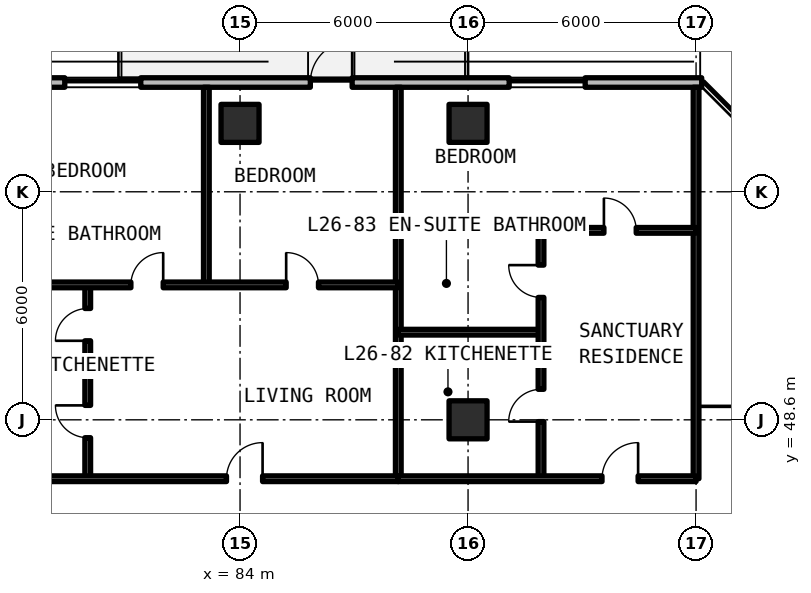
"""IFC4 building model, lengths in metres.
Left out: names, types, materials, properties, quantities, classifications, styles, units other than length and angle.
Written with IfcOpenShell. Run it as: python <this file> out.ifc"""

import sys

from ifc_helpers import new_model, si_unit, direction, frame, frame_2d, origin, origin_2d, place, context, subcontext, project, spatial, rectangle, extrude, element, fill, save


model = new_model("IFC4")
c1 = context("Model", 3, precision=1e-05, world=origin(), true_north=direction((0.0, 1.0)))
c2 = subcontext(c1, "Body", "Model", "MODEL_VIEW")
j1 = project(units=[si_unit("LENGTHUNIT", "METRE"), si_unit("PLANEANGLEUNIT", "RADIAN")], contexts=[c1])
p1 = place(None, origin())
s1 = spatial("IfcSite", under=j1, at=p1, CompositionType="ELEMENT")
p2 = place(p1, origin())
s2 = spatial("IfcBuilding", under=s1, at=p2, CompositionType="ELEMENT")
p3 = place(p2, frame((0.0, 0.0, 95.37)))
s3 = spatial("IfcBuildingStorey", under=s2, at=p3, CompositionType="ELEMENT", Elevation=95.37)
for number, where, z_axis, x_axis in (
    (1, (90.0, 48.6, 0.0), (0.0, 0.0, 1.0), (1.0, 0.0, 0.0)),
    (2, (84.0, 56.4, 0.0), (0.0, 0.0, 1.0), (1.0, 0.0, 0.0)),
    (3, (90.0, 56.4, 0.0), (0.0, 0.0, 1.0), (1.0, 0.0, 0.0)),
):
    element("IfcColumn", number, at=place(p3, frame(where, z_axis=z_axis, x_axis=x_axis)), inside=s3, PredefinedType="COLUMN", context=c2, shape_type="SweptSolid", body=[
        extrude(rectangle(XDim=1.0, YDim=1.0, at=origin_2d()), origin(), (0.0, 0.0, 1.0), 3.3),
    ])
p4 = place(p3, frame((96.148, 57.475, 0.0), z_axis=(0.0, 0.0, 1.0), x_axis=(-1.0, 0.0, 0.0)))
e4 = element("IfcWall", 4, at=p4, inside=s3, PredefinedType="SOLIDWALL", context=c2, shape_type="SweptSolid", body=[
    extrude(rectangle(XDim=44.023, YDim=0.25, at=frame_2d((22.012, 0.0))), origin(), (0.0, 0.0, 1.0), 3.08),
])
p5 = place(p4, frame((33.148, 0.0, 0.0)))
e5 = element("IfcOpeningElement", 5, at=p5, cuts=e4, PredefinedType="OPENING", context=c2, shape_type="SweptSolid", body=[
    extrude(rectangle(XDim=1.1, YDim=2.15, at=frame_2d((0.55, 1.075))), frame((0.0, 0.135, 0.0), z_axis=(0.0, -1.0, 0.0), x_axis=(1.0, 0.0, 0.0)), (0.0, 0.0, 1.0), 0.27),
])
p6 = place(p4, frame((21.298, 0.0, 0.0)))
e6 = element("IfcOpeningElement", 6, at=p6, cuts=e4, PredefinedType="OPENING", context=c2, shape_type="SweptSolid", body=[
    extrude(rectangle(XDim=1.1, YDim=2.15, at=frame_2d((0.55, 1.075))), frame((0.0, 0.135, 0.0), z_axis=(0.0, -1.0, 0.0), x_axis=(1.0, 0.0, 0.0)), (0.0, 0.0, 1.0), 0.27),
])
p7 = place(p4, frame((9.198, 0.0, 0.0)))
e7 = element("IfcOpeningElement", 7, at=p7, cuts=e4, PredefinedType="OPENING", context=c2, shape_type="SweptSolid", body=[
    extrude(rectangle(XDim=1.1, YDim=2.15, at=frame_2d((0.55, 1.075))), frame((0.0, 0.135, 0.0), z_axis=(0.0, -1.0, 0.0), x_axis=(1.0, 0.0, 0.0)), (0.0, 0.0, 1.0), 0.27),
])
p8 = place(p4, frame((39.334, 0.0, 0.78)))
e8 = element("IfcOpeningElement", 8, at=p8, cuts=e4, PredefinedType="OPENING", context=c2, shape_type="SweptSolid", body=[
    extrude(rectangle(XDim=2.0, YDim=1.66, at=frame_2d((1.0, 0.83))), frame((0.0, 0.135, 0.0), z_axis=(0.0, -1.0, 0.0), x_axis=(1.0, 0.0, 0.0)), (0.0, 0.0, 1.0), 0.27),
])
p9 = place(p4, frame((27.354, 0.0, 0.78)))
e9 = element("IfcOpeningElement", 9, at=p9, cuts=e4, PredefinedType="OPENING", context=c2, shape_type="SweptSolid", body=[
    extrude(rectangle(XDim=2.0, YDim=1.66, at=frame_2d((1.0, 0.83))), frame((0.0, 0.135, 0.0), z_axis=(0.0, -1.0, 0.0), x_axis=(1.0, 0.0, 0.0)), (0.0, 0.0, 1.0), 0.27),
])
p10 = place(p4, frame((14.76, 0.0, 0.78)))
e10 = element("IfcOpeningElement", 10, at=p10, cuts=e4, PredefinedType="OPENING", context=c2, shape_type="SweptSolid", body=[
    extrude(rectangle(XDim=2.0, YDim=1.66, at=frame_2d((1.0, 0.83))), frame((0.0, 0.135, 0.0), z_axis=(0.0, -1.0, 0.0), x_axis=(1.0, 0.0, 0.0)), (0.0, 0.0, 1.0), 0.27),
])
p11 = place(p4, frame((3.066, 0.0, 0.78)))
e11 = element("IfcOpeningElement", 11, at=p11, cuts=e4, PredefinedType="OPENING", context=c2, shape_type="SweptSolid", body=[
    extrude(rectangle(XDim=2.0, YDim=1.66, at=frame_2d((1.0, 0.83))), frame((0.0, 0.135, 0.0), z_axis=(0.0, -1.0, 0.0), x_axis=(1.0, 0.0, 0.0)), (0.0, 0.0, 1.0), 0.27),
])
for number, where, z_axis, x_axis in (
    (12, (96.0, 47.05, 0.0), (0.0, 0.0, 1.0), (0.0, 1.0, 0.0)),
    (13, (88.164, 47.05, 0.0), (0.0, 0.0, 1.0), (0.0, 1.0, 0.0)),
):
    element("IfcWall", number, at=place(p3, frame(where, z_axis=z_axis, x_axis=x_axis)), inside=s3, PredefinedType="SOLIDWALL", context=c2, shape_type="SweptSolid", body=[
        extrude(rectangle(XDim=10.3, YDim=0.15, at=frame_2d((5.15, 0.0))), origin(), (0.0, 0.0, 1.0), 2.35),
    ])
p12 = place(p3, frame((77.642, 50.059, 0.0), z_axis=(0.0, 0.0, 1.0), x_axis=(1.0, 0.0, 0.0)))
e14 = element("IfcWall", 14, at=p12, inside=s3, PredefinedType="PARTITIONING", context=c2, shape_type="SweptSolid", body=[
    extrude(rectangle(XDim=2.35, YDim=0.15, at=frame_2d((1.175, 0.0))), origin(), (0.0, 0.0, 1.0), 2.35),
])
p13 = place(p3, frame((79.992, 47.05, 0.0), z_axis=(0.0, 0.0, 1.0), x_axis=(0.0, 1.0, 0.0)))
e15 = element("IfcWall", 15, at=p13, inside=s3, PredefinedType="PARTITIONING", context=c2, shape_type="SweptSolid", body=[
    extrude(rectangle(XDim=5.1, YDim=0.15, at=frame_2d((2.55, 0.0))), origin(), (0.0, 0.0, 1.0), 2.35),
])
p14 = place(p13, frame((1.08, 0.0, 0.0)))
e16 = element("IfcOpeningElement", 16, at=p14, cuts=e15, PredefinedType="OPENING", context=c2, shape_type="SweptSolid", body=[
    extrude(rectangle(XDim=0.85, YDim=2.1, at=frame_2d((0.425, 1.05))), frame((0.0, 0.085, 0.0), z_axis=(0.0, -1.0, 0.0), x_axis=(1.0, 0.0, 0.0)), (0.0, 0.0, 1.0), 0.17),
])
p15 = place(p13, frame((3.629, 0.0, 0.0)))
e17 = element("IfcOpeningElement", 17, at=p15, cuts=e15, PredefinedType="OPENING", context=c2, shape_type="SweptSolid", body=[
    extrude(rectangle(XDim=0.85, YDim=2.1, at=frame_2d((0.425, 1.05))), frame((0.0, 0.085, 0.0), z_axis=(0.0, -1.0, 0.0), x_axis=(1.0, 0.0, 0.0)), (0.0, 0.0, 1.0), 0.17),
])
p16 = place(p3, frame((83.114, 52.15, 0.0), z_axis=(0.0, 0.0, 1.0), x_axis=(0.0, 1.0, 0.0)))
e18 = element("IfcWall", 18, at=p16, inside=s3, PredefinedType="PARTITIONING", context=c2, shape_type="SweptSolid", body=[
    extrude(rectangle(XDim=5.2, YDim=0.15, at=frame_2d((2.6, 0.0))), origin(), (0.0, 0.0, 1.0), 2.35),
])
p17 = place(p3, frame((77.642, 52.15, 0.0), z_axis=(0.0, 0.0, 1.0), x_axis=(1.0, 0.0, 0.0)))
e19 = element("IfcWall", 19, at=p17, inside=s3, PredefinedType="PARTITIONING", context=c2, shape_type="SweptSolid", body=[
    extrude(rectangle(XDim=10.522, YDim=0.15, at=frame_2d((5.261, 0.0))), origin(), (0.0, 0.0, 1.0), 2.35),
])
p18 = place(p17, frame((3.486, 0.0, 0.0)))
e20 = element("IfcOpeningElement", 20, at=p18, cuts=e19, PredefinedType="OPENING", context=c2, shape_type="SweptSolid", body=[
    extrude(rectangle(XDim=0.85, YDim=2.1, at=frame_2d((0.425, 1.05))), frame((0.0, 0.085, 0.0), z_axis=(0.0, -1.0, 0.0), x_axis=(1.0, 0.0, 0.0)), (0.0, 0.0, 1.0), 0.17),
])
p19 = place(p17, frame((7.572, 0.0, 0.0)))
e21 = element("IfcOpeningElement", 21, at=p19, cuts=e19, PredefinedType="OPENING", context=c2, shape_type="SweptSolid", body=[
    extrude(rectangle(XDim=0.85, YDim=2.1, at=frame_2d((0.425, 1.05))), frame((0.0, 0.085, 0.0), z_axis=(0.0, -1.0, 0.0), x_axis=(1.0, 0.0, 0.0)), (0.0, 0.0, 1.0), 0.17),
])
p20 = place(p3, frame((77.642, 47.05, 0.0), z_axis=(0.0, 0.0, 1.0), x_axis=(1.0, 0.0, 0.0)))
e22 = element("IfcWall", 22, at=p20, inside=s3, PredefinedType="SOLIDWALL", context=c2, shape_type="SweptSolid", body=[
    extrude(rectangle(XDim=10.522, YDim=0.15, at=frame_2d((5.261, 0.0))), origin(), (0.0, 0.0, 1.0), 2.35),
])
p21 = place(p20, frame((6.001, 0.0, 0.0)))
e23 = element("IfcOpeningElement", 23, at=p21, cuts=e22, PredefinedType="OPENING", context=c2, shape_type="SweptSolid", body=[
    extrude(rectangle(XDim=0.95, YDim=2.15, at=frame_2d((0.475, 1.075))), frame((0.0, 0.085, 0.0), z_axis=(0.0, -1.0, 0.0), x_axis=(1.0, 0.0, 0.0)), (0.0, 0.0, 1.0), 0.17),
])
p22 = place(p3, frame((88.164, 50.906, 0.0), z_axis=(0.0, 0.0, 1.0), x_axis=(1.0, 0.0, 0.0)))
e24 = element("IfcWall", 24, at=p22, inside=s3, PredefinedType="PARTITIONING", context=c2, shape_type="SweptSolid", body=[
    extrude(rectangle(XDim=3.756, YDim=0.15, at=frame_2d((1.878, 0.0))), origin(), (0.0, 0.0, 1.0), 2.35),
])
p23 = place(p3, frame((91.92, 47.05, 0.0), z_axis=(0.0, 0.0, 1.0), x_axis=(0.0, 1.0, 0.0)))
e25 = element("IfcWall", 25, at=p23, inside=s3, PredefinedType="PARTITIONING", context=c2, shape_type="SweptSolid", body=[
    extrude(rectangle(XDim=6.535, YDim=0.15, at=frame_2d((3.268, 0.0))), origin(), (0.0, 0.0, 1.0), 2.35),
])
p24 = place(p23, frame((1.503, 0.0, 0.0)))
e26 = element("IfcOpeningElement", 26, at=p24, cuts=e25, PredefinedType="OPENING", context=c2, shape_type="SweptSolid", body=[
    extrude(rectangle(XDim=0.85, YDim=2.1, at=frame_2d((0.425, 1.05))), frame((0.0, 0.085, 0.0), z_axis=(0.0, -1.0, 0.0), x_axis=(1.0, 0.0, 0.0)), (0.0, 0.0, 1.0), 0.17),
])
p25 = place(p23, frame((4.771, 0.0, 0.0)))
e27 = element("IfcOpeningElement", 27, at=p25, cuts=e25, PredefinedType="OPENING", context=c2, shape_type="SweptSolid", body=[
    extrude(rectangle(XDim=0.85, YDim=2.1, at=frame_2d((0.425, 1.05))), frame((0.0, 0.085, 0.0), z_axis=(0.0, -1.0, 0.0), x_axis=(1.0, 0.0, 0.0)), (0.0, 0.0, 1.0), 0.17),
])
p26 = place(p3, frame((88.164, 53.585, 0.0), z_axis=(0.0, 0.0, 1.0), x_axis=(1.0, 0.0, 0.0)))
e28 = element("IfcWall", 28, at=p26, inside=s3, PredefinedType="PARTITIONING", context=c2, shape_type="SweptSolid", body=[
    extrude(rectangle(XDim=7.836, YDim=0.15, at=frame_2d((3.918, 0.0))), origin(), (0.0, 0.0, 1.0), 2.35),
])
p27 = place(p26, frame((5.411, 0.0, 0.0)))
e29 = element("IfcOpeningElement", 29, at=p27, cuts=e28, PredefinedType="OPENING", context=c2, shape_type="SweptSolid", body=[
    extrude(rectangle(XDim=0.85, YDim=2.1, at=frame_2d((0.425, 1.05))), frame((0.0, 0.085, 0.0), z_axis=(0.0, -1.0, 0.0), x_axis=(1.0, 0.0, 0.0)), (0.0, 0.0, 1.0), 0.17),
])
p28 = place(p3, frame((88.164, 47.05, 0.0), z_axis=(0.0, 0.0, 1.0), x_axis=(1.0, 0.0, 0.0)))
e30 = element("IfcWall", 30, at=p28, inside=s3, PredefinedType="SOLIDWALL", context=c2, shape_type="SweptSolid", body=[
    extrude(rectangle(XDim=7.836, YDim=0.15, at=frame_2d((3.918, 0.0))), origin(), (0.0, 0.0, 1.0), 2.35),
])
p29 = place(p28, frame((5.361, 0.0, 0.0)))
e31 = element("IfcOpeningElement", 31, at=p29, cuts=e30, PredefinedType="OPENING", context=c2, shape_type="SweptSolid", body=[
    extrude(rectangle(XDim=0.95, YDim=2.15, at=frame_2d((0.475, 1.075))), frame((0.0, 0.085, 0.0), z_axis=(0.0, -1.0, 0.0), x_axis=(1.0, 0.0, 0.0)), (0.0, 0.0, 1.0), 0.17),
])
p30 = place(p7, frame((1.1, 0.0, 0.0), z_axis=(0.0, 0.0, 1.0), x_axis=(-1.0, 0.0, 0.0)))
e32 = element("IfcDoor", 32, at=p30, inside=s3, OperationType="SINGLE_SWING_LEFT", PredefinedType="DOOR", context=c2, shape_type="SweptSolid", body=[
    extrude(rectangle(XDim=1.1, YDim=2.15, at=frame_2d((0.55, 1.075))), frame((0.0, 0.025, 0.0), z_axis=(0.0, -1.0, 0.0), x_axis=(1.0, 0.0, 0.0)), (0.0, 0.0, 1.0), 0.05),
])
fill(e7, e32)
p31 = place(p10, origin())
e33 = element("IfcWindow", 33, at=p31, inside=s3, PartitioningType="SINGLE_PANEL", PredefinedType="WINDOW", context=c2, shape_type="SweptSolid", body=[
    extrude(rectangle(XDim=2.0, YDim=1.66, at=frame_2d((1.0, 0.83))), frame((0.0, 0.03, 0.0), z_axis=(0.0, -1.0, 0.0), x_axis=(1.0, 0.0, 0.0)), (0.0, 0.0, 1.0), 0.06),
])
fill(e10, e33)
p32 = place(p11, origin())
e34 = element("IfcWindow", 34, at=p32, inside=s3, PartitioningType="SINGLE_PANEL", PredefinedType="WINDOW", context=c2, shape_type="SweptSolid", body=[
    extrude(rectangle(XDim=2.0, YDim=1.66, at=frame_2d((1.0, 0.83))), frame((0.0, 0.03, 0.0), z_axis=(0.0, -1.0, 0.0), x_axis=(1.0, 0.0, 0.0)), (0.0, 0.0, 1.0), 0.06),
])
fill(e11, e34)
p33 = place(p14, origin())
e35 = element("IfcDoor", 35, at=p33, inside=s3, OperationType="SINGLE_SWING_RIGHT", PredefinedType="DOOR", context=c2, shape_type="SweptSolid", body=[
    extrude(rectangle(XDim=0.85, YDim=2.1, at=frame_2d((0.425, 1.05))), frame((0.0, 0.025, 0.0), z_axis=(0.0, -1.0, 0.0), x_axis=(1.0, 0.0, 0.0)), (0.0, 0.0, 1.0), 0.05),
])
fill(e16, e35)
p34 = place(p15, origin())
e36 = element("IfcDoor", 36, at=p34, inside=s3, OperationType="SINGLE_SWING_LEFT", PredefinedType="DOOR", context=c2, shape_type="SweptSolid", body=[
    extrude(rectangle(XDim=0.85, YDim=2.1, at=frame_2d((0.425, 1.05))), frame((0.0, 0.025, 0.0), z_axis=(0.0, -1.0, 0.0), x_axis=(1.0, 0.0, 0.0)), (0.0, 0.0, 1.0), 0.05),
])
fill(e17, e36)
p35 = place(p18, origin())
e37 = element("IfcDoor", 37, at=p35, inside=s3, OperationType="SINGLE_SWING_RIGHT", PredefinedType="DOOR", context=c2, shape_type="SweptSolid", body=[
    extrude(rectangle(XDim=0.85, YDim=2.1, at=frame_2d((0.425, 1.05))), frame((0.0, 0.025, 0.0), z_axis=(0.0, -1.0, 0.0), x_axis=(1.0, 0.0, 0.0)), (0.0, 0.0, 1.0), 0.05),
])
fill(e20, e37)
p36 = place(p19, origin())
e38 = element("IfcDoor", 38, at=p36, inside=s3, OperationType="SINGLE_SWING_LEFT", PredefinedType="DOOR", context=c2, shape_type="SweptSolid", body=[
    extrude(rectangle(XDim=0.85, YDim=2.1, at=frame_2d((0.425, 1.05))), frame((0.0, 0.025, 0.0), z_axis=(0.0, -1.0, 0.0), x_axis=(1.0, 0.0, 0.0)), (0.0, 0.0, 1.0), 0.05),
])
fill(e21, e38)
p37 = place(p21, origin())
e39 = element("IfcDoor", 39, at=p37, inside=s3, OperationType="SINGLE_SWING_RIGHT", PredefinedType="DOOR", context=c2, shape_type="SweptSolid", body=[
    extrude(rectangle(XDim=0.95, YDim=2.15, at=frame_2d((0.475, 1.075))), frame((0.0, 0.025, 0.0), z_axis=(0.0, -1.0, 0.0), x_axis=(1.0, 0.0, 0.0)), (0.0, 0.0, 1.0), 0.05),
])
fill(e23, e39)
p38 = place(p24, origin())
e40 = element("IfcDoor", 40, at=p38, inside=s3, OperationType="SINGLE_SWING_LEFT", PredefinedType="DOOR", context=c2, shape_type="SweptSolid", body=[
    extrude(rectangle(XDim=0.85, YDim=2.1, at=frame_2d((0.425, 1.05))), frame((0.0, 0.025, 0.0), z_axis=(0.0, -1.0, 0.0), x_axis=(1.0, 0.0, 0.0)), (0.0, 0.0, 1.0), 0.05),
])
fill(e26, e40)
p39 = place(p25, origin())
e41 = element("IfcDoor", 41, at=p39, inside=s3, OperationType="SINGLE_SWING_RIGHT", PredefinedType="DOOR", context=c2, shape_type="SweptSolid", body=[
    extrude(rectangle(XDim=0.85, YDim=2.1, at=frame_2d((0.425, 1.05))), frame((0.0, 0.025, 0.0), z_axis=(0.0, -1.0, 0.0), x_axis=(1.0, 0.0, 0.0)), (0.0, 0.0, 1.0), 0.05),
])
fill(e27, e41)
p40 = place(p27, origin())
e42 = element("IfcDoor", 42, at=p40, inside=s3, OperationType="SINGLE_SWING_LEFT", PredefinedType="DOOR", context=c2, shape_type="SweptSolid", body=[
    extrude(rectangle(XDim=0.85, YDim=2.1, at=frame_2d((0.425, 1.05))), frame((0.0, 0.025, 0.0), z_axis=(0.0, -1.0, 0.0), x_axis=(1.0, 0.0, 0.0)), (0.0, 0.0, 1.0), 0.05),
])
fill(e29, e42)
p41 = place(p29, origin())
e43 = element("IfcDoor", 43, at=p41, inside=s3, OperationType="SINGLE_SWING_RIGHT", PredefinedType="DOOR", context=c2, shape_type="SweptSolid", body=[
    extrude(rectangle(XDim=0.95, YDim=2.15, at=frame_2d((0.475, 1.075))), frame((0.0, 0.025, 0.0), z_axis=(0.0, -1.0, 0.0), x_axis=(1.0, 0.0, 0.0)), (0.0, 0.0, 1.0), 0.05),
])
fill(e31, e43)
save(model, sys.argv[1])
